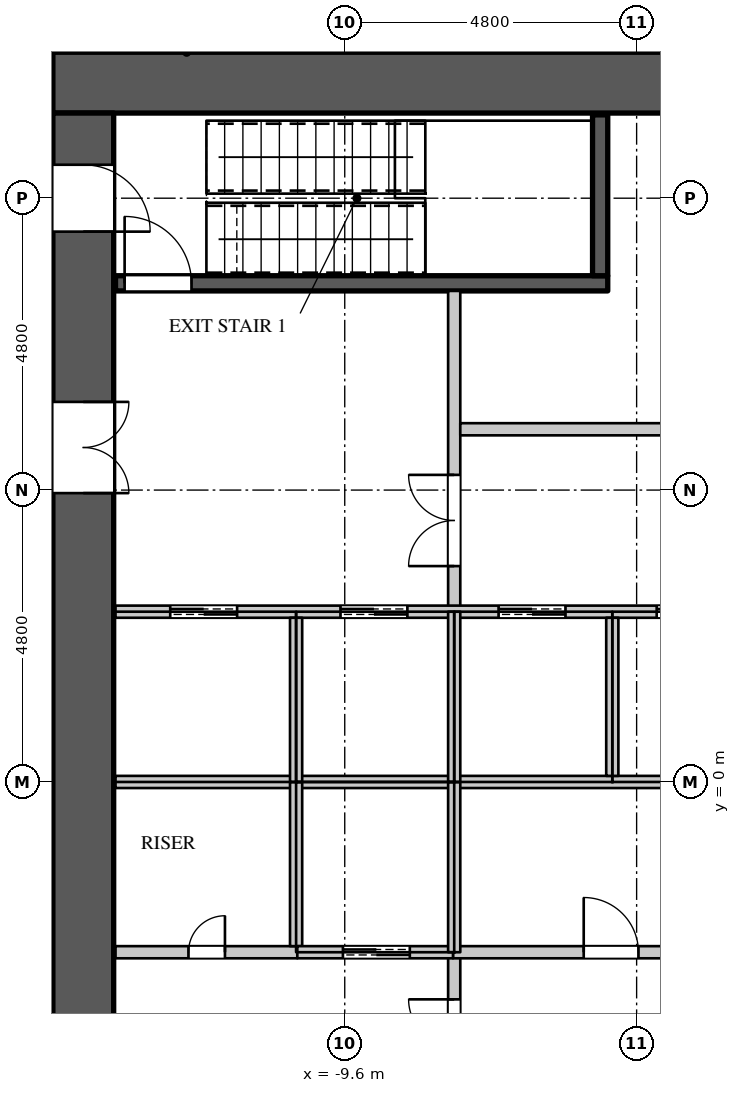
"""IFC4 building model, lengths in metres.
Left out: names, types, materials, properties, quantities, classifications, styles, units other than length and angle.
Written with IfcOpenShell. Run it as: python <this file> out.ifc"""

import sys

from ifc_helpers import new_model, si_unit, direction, frame, frame_2d, origin, place, context, subcontext, project, spatial, rectangle, extrude, element, fill, save


model = new_model("IFC4")
c1 = context("Model", 3, precision=1e-05, world=origin(), true_north=direction((0.0, 1.0)))
c2 = subcontext(c1, "Body", "Model", "MODEL_VIEW")
j1 = project(units=[si_unit("LENGTHUNIT", "METRE"), si_unit("PLANEANGLEUNIT", "RADIAN")], contexts=[c1])
p1 = place(None, origin())
s1 = spatial("IfcSite", under=j1, at=p1, CompositionType="ELEMENT")
p2 = place(p1, origin())
s2 = spatial("IfcBuilding", under=s1, at=p2, CompositionType="ELEMENT")
p3 = place(p2, frame((0.0, 0.0, 96.9)))
s3 = spatial("IfcBuildingStorey", under=s2, at=p3, CompositionType="ELEMENT", Elevation=96.9)
p4 = place(p3, frame((-14.4, 11.5, 0.0), z_axis=(0.0, 0.0, 1.0), x_axis=(1.0, 0.0, 0.0)))
e1 = element("IfcWall", 1, at=p4, inside=s3, PredefinedType="SHEAR", context=c2, shape_type="SweptSolid", body=[
    extrude(rectangle(XDim=28.8, YDim=1.0, at=frame_2d((14.4, 0.0))), origin(), (0.0, 0.0, 1.0), 4.2),
])
p5 = place(p3, frame((-13.9, -11.0, 0.0), z_axis=(0.0, 0.0, 1.0), x_axis=(0.0, 1.0, 0.0)))
e2 = element("IfcWall", 2, at=p5, inside=s3, PredefinedType="SHEAR", context=c2, shape_type="SweptSolid", body=[
    extrude(rectangle(XDim=22.0, YDim=1.0, at=frame_2d((11.0, 0.0))), origin(), (0.0, 0.0, 1.0), 4.2),
])
p6 = place(p5, frame((20.05, 0.0, 0.0)))
e3 = element("IfcOpeningElement", 3, at=p6, cuts=e2, PredefinedType="OPENING", context=c2, shape_type="SweptSolid", body=[
    extrude(rectangle(XDim=1.1, YDim=2.2, at=frame_2d((0.55, 1.1))), frame((0.0, 0.51, 0.0), z_axis=(0.0, -1.0, 0.0), x_axis=(1.0, 0.0, 0.0)), (0.0, 0.0, 1.0), 1.02),
])
p7 = place(p5, frame((0.85, 0.0, 0.0)))
e4 = element("IfcOpeningElement", 4, at=p7, cuts=e2, PredefinedType="OPENING", context=c2, shape_type="SweptSolid", body=[
    extrude(rectangle(XDim=1.1, YDim=2.2, at=frame_2d((0.55, 1.1))), frame((0.0, 0.51, 0.0), z_axis=(0.0, -1.0, 0.0), x_axis=(1.0, 0.0, 0.0)), (0.0, 0.0, 1.0), 1.02),
])
p8 = place(p5, frame((15.75, 0.0, 0.0)))
e5 = element("IfcOpeningElement", 5, at=p8, cuts=e2, PredefinedType="OPENING", context=c2, shape_type="SweptSolid", body=[
    extrude(rectangle(XDim=1.5, YDim=2.4, at=frame_2d((0.75, 1.2))), frame((0.0, 0.51, 0.0), z_axis=(0.0, -1.0, 0.0), x_axis=(1.0, 0.0, 0.0)), (0.0, 0.0, 1.0), 1.02),
])
p9 = place(p5, frame((4.75, 0.0, 0.0)))
e6 = element("IfcOpeningElement", 6, at=p9, cuts=e2, PredefinedType="OPENING", context=c2, shape_type="SweptSolid", body=[
    extrude(rectangle(XDim=1.5, YDim=2.4, at=frame_2d((0.75, 1.2))), frame((0.0, 0.51, 0.0), z_axis=(0.0, -1.0, 0.0), x_axis=(1.0, 0.0, 0.0)), (0.0, 0.0, 1.0), 1.02),
])
p10 = place(p3, frame((-7.8, -8.075, 0.0), z_axis=(0.0, 0.0, 1.0), x_axis=(0.0, 1.0, 0.0)))
e7 = element("IfcWall", 7, at=p10, inside=s3, PredefinedType="PARTITIONING", context=c2, shape_type="SweptSolid", body=[
    extrude(rectangle(XDim=5.275, YDim=0.2, at=frame_2d((2.637, 0.0))), origin(), (0.0, 0.0, 1.0), 3.798),
])
p11 = place(p10, frame((3.0, 0.0, 0.0)))
e8 = element("IfcOpeningElement", 8, at=p11, cuts=e7, PredefinedType="OPENING", context=c2, shape_type="SweptSolid", body=[
    extrude(rectangle(XDim=1.5, YDim=2.4, at=frame_2d((0.75, 1.2))), frame((0.0, 0.11, 0.0), z_axis=(0.0, -1.0, 0.0), x_axis=(1.0, 0.0, 0.0)), (0.0, 0.0, 1.0), 0.22),
])
p12 = place(p3, frame((-7.8, 2.8, 0.0), z_axis=(0.0, 0.0, 1.0), x_axis=(0.0, 1.0, 0.0)))
e9 = element("IfcWall", 9, at=p12, inside=s3, PredefinedType="PARTITIONING", context=c2, shape_type="SweptSolid", body=[
    extrude(rectangle(XDim=5.275, YDim=0.2, at=frame_2d((2.637, 0.0))), origin(), (0.0, 0.0, 1.0), 3.798),
])
p13 = place(p12, frame((0.75, 0.0, 0.0)))
e10 = element("IfcOpeningElement", 10, at=p13, cuts=e9, PredefinedType="OPENING", context=c2, shape_type="SweptSolid", body=[
    extrude(rectangle(XDim=1.5, YDim=2.4, at=frame_2d((0.75, 1.2))), frame((0.0, 0.11, 0.0), z_axis=(0.0, -1.0, 0.0), x_axis=(1.0, 0.0, 0.0)), (0.0, 0.0, 1.0), 0.22),
])
p14 = place(p3, frame((-7.7, 5.8, 0.0), z_axis=(0.0, 0.0, 1.0), x_axis=(1.0, 0.0, 0.0)))
e11 = element("IfcWall", 11, at=p14, inside=s3, PredefinedType="PARTITIONING", context=c2, shape_type="SweptSolid", body=[
    extrude(rectangle(XDim=21.07, YDim=0.2, at=frame_2d((10.535, 0.0))), origin(), (0.0, 0.0, 1.0), 3.798),
])
p15 = place(p14, frame((4.85, 0.0, 0.0)))
e12 = element("IfcOpeningElement", 12, at=p15, cuts=e11, PredefinedType="OPENING", context=c2, shape_type="SweptSolid", body=[
    extrude(rectangle(XDim=0.9, YDim=2.2, at=frame_2d((0.45, 1.1))), frame((0.0, 0.11, 0.0), z_axis=(0.0, -1.0, 0.0), x_axis=(1.0, 0.0, 0.0)), (0.0, 0.0, 1.0), 0.22),
])
p16 = place(p14, frame((15.25, 0.0, 0.0)))
e13 = element("IfcOpeningElement", 13, at=p16, cuts=e11, PredefinedType="OPENING", context=c2, shape_type="SweptSolid", body=[
    extrude(rectangle(XDim=0.9, YDim=2.2, at=frame_2d((0.45, 1.1))), frame((0.0, 0.11, 0.0), z_axis=(0.0, -1.0, 0.0), x_axis=(1.0, 0.0, 0.0)), (0.0, 0.0, 1.0), 0.22),
])
p17 = place(p3, frame((-13.37, -2.8, 0.0), z_axis=(0.0, 0.0, 1.0), x_axis=(1.0, 0.0, 0.0)))
e14 = element("IfcWall", 14, at=p17, inside=s3, PredefinedType="PARTITIONING", context=c2, shape_type="SweptSolid", body=[
    extrude(rectangle(XDim=2.99, YDim=0.2, at=frame_2d((1.495, 0.0))), origin(), (0.0, 0.0, 1.0), 3.798),
])
p18 = place(p17, frame((1.2, 0.0, 0.0)))
e15 = element("IfcOpeningElement", 15, at=p18, cuts=e14, PredefinedType="OPENING", context=c2, shape_type="SweptSolid", body=[
    extrude(rectangle(XDim=0.6, YDim=2.0, at=frame_2d((0.3, 1.0))), frame((0.0, 0.11, 0.0), z_axis=(0.0, -1.0, 0.0), x_axis=(1.0, 0.0, 0.0)), (0.0, 0.0, 1.0), 0.22),
])
p19 = place(p3, frame((-7.82, -2.8, 0.0), z_axis=(0.0, 0.0, 1.0), x_axis=(1.0, 0.0, 0.0)))
e16 = element("IfcWall", 16, at=p19, inside=s3, PredefinedType="PARTITIONING", context=c2, shape_type="SweptSolid", body=[
    extrude(rectangle(XDim=5.2, YDim=0.2, at=frame_2d((2.6, 0.0))), origin(), (0.0, 0.0, 1.0), 3.798),
])
p20 = place(p19, frame((2.15, 0.0, 0.0)))
e17 = element("IfcOpeningElement", 17, at=p20, cuts=e16, PredefinedType="OPENING", context=c2, shape_type="SweptSolid", body=[
    extrude(rectangle(XDim=0.9, YDim=2.2, at=frame_2d((0.45, 1.1))), frame((0.0, 0.11, 0.0), z_axis=(0.0, -1.0, 0.0), x_axis=(1.0, 0.0, 0.0)), (0.0, 0.0, 1.0), 0.22),
])
p21 = place(p3, frame((-13.37, 0.0, 0.0), z_axis=(0.0, 0.0, 1.0), x_axis=(1.0, 0.0, 0.0)))
e18 = element("IfcWall", 18, at=p21, inside=s3, PredefinedType="PARTITIONING", context=c2, shape_type="SweptSolid", body=[
    extrude(rectangle(XDim=23.77, YDim=0.2, at=frame_2d((11.885, 0.0))), origin(), (0.0, 0.0, 1.0), 3.798),
])
p22 = place(p3, frame((-13.37, 2.8, 0.0), z_axis=(0.0, 0.0, 1.0), x_axis=(1.0, 0.0, 0.0)))
e19 = element("IfcWall", 19, at=p22, inside=s3, PredefinedType="PARTITIONING", context=c2, shape_type="SweptSolid", body=[
    extrude(rectangle(XDim=23.77, YDim=0.2, at=frame_2d((11.885, 0.0))), origin(), (0.0, 0.0, 1.0), 3.798),
])
p23 = place(p22, frame((0.9, 0.0, 0.0)))
e20 = element("IfcOpeningElement", 20, at=p23, cuts=e19, PredefinedType="OPENING", context=c2, shape_type="SweptSolid", body=[
    extrude(rectangle(XDim=1.1, YDim=2.2, at=frame_2d((0.55, 1.1))), frame((0.0, 0.11, 0.0), z_axis=(0.0, -1.0, 0.0), x_axis=(1.0, 0.0, 0.0)), (0.0, 0.0, 1.0), 0.22),
])
p24 = place(p22, frame((3.7, 0.0, 0.0)))
e21 = element("IfcOpeningElement", 21, at=p24, cuts=e19, PredefinedType="OPENING", context=c2, shape_type="SweptSolid", body=[
    extrude(rectangle(XDim=1.1, YDim=2.2, at=frame_2d((0.55, 1.1))), frame((0.0, 0.11, 0.0), z_axis=(0.0, -1.0, 0.0), x_axis=(1.0, 0.0, 0.0)), (0.0, 0.0, 1.0), 0.22),
])
p25 = place(p22, frame((6.3, 0.0, 0.0)))
e22 = element("IfcOpeningElement", 22, at=p25, cuts=e19, PredefinedType="OPENING", context=c2, shape_type="SweptSolid", body=[
    extrude(rectangle(XDim=1.1, YDim=2.2, at=frame_2d((0.55, 1.1))), frame((0.0, 0.11, 0.0), z_axis=(0.0, -1.0, 0.0), x_axis=(1.0, 0.0, 0.0)), (0.0, 0.0, 1.0), 0.22),
])
p26 = place(p22, frame((8.9, 0.0, 0.0)))
e23 = element("IfcOpeningElement", 23, at=p26, cuts=e19, PredefinedType="OPENING", context=c2, shape_type="SweptSolid", body=[
    extrude(rectangle(XDim=1.1, YDim=2.2, at=frame_2d((0.55, 1.1))), frame((0.0, 0.11, 0.0), z_axis=(0.0, -1.0, 0.0), x_axis=(1.0, 0.0, 0.0)), (0.0, 0.0, 1.0), 0.22),
])
p27 = place(p22, frame((11.5, 0.0, 0.0)))
e24 = element("IfcOpeningElement", 24, at=p27, cuts=e19, PredefinedType="OPENING", context=c2, shape_type="SweptSolid", body=[
    extrude(rectangle(XDim=1.1, YDim=2.2, at=frame_2d((0.55, 1.1))), frame((0.0, 0.11, 0.0), z_axis=(0.0, -1.0, 0.0), x_axis=(1.0, 0.0, 0.0)), (0.0, 0.0, 1.0), 0.22),
])
p28 = place(p22, frame((14.1, 0.0, 0.0)))
e25 = element("IfcOpeningElement", 25, at=p28, cuts=e19, PredefinedType="OPENING", context=c2, shape_type="SweptSolid", body=[
    extrude(rectangle(XDim=1.1, YDim=2.2, at=frame_2d((0.55, 1.1))), frame((0.0, 0.11, 0.0), z_axis=(0.0, -1.0, 0.0), x_axis=(1.0, 0.0, 0.0)), (0.0, 0.0, 1.0), 0.22),
])
p29 = place(p22, frame((16.7, 0.0, 0.0)))
e26 = element("IfcOpeningElement", 26, at=p29, cuts=e19, PredefinedType="OPENING", context=c2, shape_type="SweptSolid", body=[
    extrude(rectangle(XDim=1.1, YDim=2.2, at=frame_2d((0.55, 1.1))), frame((0.0, 0.11, 0.0), z_axis=(0.0, -1.0, 0.0), x_axis=(1.0, 0.0, 0.0)), (0.0, 0.0, 1.0), 0.22),
])
p30 = place(p22, frame((19.3, 0.0, 0.0)))
e27 = element("IfcOpeningElement", 27, at=p30, cuts=e19, PredefinedType="OPENING", context=c2, shape_type="SweptSolid", body=[
    extrude(rectangle(XDim=1.1, YDim=2.2, at=frame_2d((0.55, 1.1))), frame((0.0, 0.11, 0.0), z_axis=(0.0, -1.0, 0.0), x_axis=(1.0, 0.0, 0.0)), (0.0, 0.0, 1.0), 0.22),
])
p31 = place(p3, frame((-10.4, -2.7, 0.0), z_axis=(0.0, 0.0, 1.0), x_axis=(0.0, 1.0, 0.0)))
e28 = element("IfcWall", 28, at=p31, inside=s3, PredefinedType="PARTITIONING", context=c2, shape_type="SweptSolid", body=[
    extrude(rectangle(XDim=2.7, YDim=0.2, at=frame_2d((1.35, 0.0))), origin(), (0.0, 0.0, 1.0), 3.798),
])
p32 = place(p3, frame((-10.38, -2.8, 0.0), z_axis=(0.0, 0.0, 1.0), x_axis=(1.0, 0.0, 0.0)))
e29 = element("IfcWall", 29, at=p32, inside=s3, PredefinedType="PARTITIONING", context=c2, shape_type="SweptSolid", body=[
    extrude(rectangle(XDim=2.56, YDim=0.2, at=frame_2d((1.28, 0.0))), origin(), (0.0, 0.0, 1.0), 3.798),
])
p33 = place(p32, frame((0.75, 0.0, 0.0)))
e30 = element("IfcOpeningElement", 30, at=p33, cuts=e29, PredefinedType="OPENING", context=c2, shape_type="SweptSolid", body=[
    extrude(rectangle(XDim=1.1, YDim=2.2, at=frame_2d((0.55, 1.1))), frame((0.0, 0.11, 0.0), z_axis=(0.0, -1.0, 0.0), x_axis=(1.0, 0.0, 0.0)), (0.0, 0.0, 1.0), 0.22),
])
p34 = place(p3, frame((-10.4, 0.0, 0.0), z_axis=(0.0, 0.0, 1.0), x_axis=(0.0, 1.0, 0.0)))
e31 = element("IfcWall", 31, at=p34, inside=s3, PredefinedType="PARTITIONING", context=c2, shape_type="SweptSolid", body=[
    extrude(rectangle(XDim=2.7, YDim=0.2, at=frame_2d((1.35, 0.0))), origin(), (0.0, 0.0, 1.0), 3.798),
])
for number, where, z_axis, x_axis in (
    (32, (-7.8, -2.8, 0.0), (0.0, 0.0, 1.0), (0.0, 1.0, 0.0)),
    (33, (-7.8, 0.0, 0.0), (0.0, 0.0, 1.0), (0.0, 1.0, 0.0)),
):
    element("IfcWall", number, at=place(p3, frame(where, z_axis=z_axis, x_axis=x_axis)), inside=s3, PredefinedType="PARTITIONING", context=c2, shape_type="SweptSolid", body=[
        extrude(rectangle(XDim=2.8, YDim=0.2, at=frame_2d((1.4, 0.0))), origin(), (0.0, 0.0, 1.0), 3.798),
    ])
p35 = place(p3, frame((-5.2, 0.1, 0.0), z_axis=(0.0, 0.0, 1.0), x_axis=(0.0, 1.0, 0.0)))
e34 = element("IfcWall", 34, at=p35, inside=s3, PredefinedType="PARTITIONING", context=c2, shape_type="SweptSolid", body=[
    extrude(rectangle(XDim=2.6, YDim=0.2, at=frame_2d((1.3, 0.0))), origin(), (0.0, 0.0, 1.0), 3.798),
])
p36 = place(p3, frame((-13.37, 8.2, 0.0), z_axis=(0.0, 0.0, 1.0), x_axis=(1.0, 0.0, 0.0)))
e35 = element("IfcWall", 35, at=p36, inside=s3, PredefinedType="SHEAR", context=c2, shape_type="SweptSolid", body=[
    extrude(rectangle(XDim=8.095, YDim=0.25, at=frame_2d((4.048, 0.0))), origin(), (0.0, 0.0, 1.0), 3.798),
])
p37 = place(p36, frame((0.15, 0.0, 0.0)))
e36 = element("IfcOpeningElement", 36, at=p37, cuts=e35, PredefinedType="OPENING", context=c2, shape_type="SweptSolid", body=[
    extrude(rectangle(XDim=1.1, YDim=2.2, at=frame_2d((0.55, 1.1))), frame((0.0, 0.135, 0.0), z_axis=(0.0, -1.0, 0.0), x_axis=(1.0, 0.0, 0.0)), (0.0, 0.0, 1.0), 0.27),
])
p38 = place(p3, frame((-5.4, 8.325, 0.0), z_axis=(0.0, 0.0, 1.0), x_axis=(0.0, 1.0, 0.0)))
e37 = element("IfcWall", 37, at=p38, inside=s3, PredefinedType="SHEAR", context=c2, shape_type="SweptSolid", body=[
    extrude(rectangle(XDim=2.645, YDim=0.25, at=frame_2d((1.323, 0.0))), origin(), (0.0, 0.0, 1.0), 3.798),
])
p39 = place(p18, origin())
e38 = element("IfcDoor", 38, at=p39, inside=s3, OperationType="SINGLE_SWING_RIGHT", PredefinedType="DOOR", context=c2, shape_type="SweptSolid", body=[
    extrude(rectangle(XDim=0.6, YDim=2.0, at=frame_2d((0.3, 1.0))), frame((0.0, 0.025, 0.0), z_axis=(0.0, -1.0, 0.0), x_axis=(1.0, 0.0, 0.0)), (0.0, 0.0, 1.0), 0.05),
])
fill(e15, e38)
p40 = place(p20, origin())
e39 = element("IfcDoor", 39, at=p40, inside=s3, OperationType="SINGLE_SWING_LEFT", PredefinedType="DOOR", context=c2, shape_type="SweptSolid", body=[
    extrude(rectangle(XDim=0.9, YDim=2.2, at=frame_2d((0.45, 1.1))), frame((0.0, 0.025, 0.0), z_axis=(0.0, -1.0, 0.0), x_axis=(1.0, 0.0, 0.0)), (0.0, 0.0, 1.0), 0.05),
])
fill(e17, e39)
p41 = place(p23, origin())
e40 = element("IfcDoor", 40, at=p41, inside=s3, OperationType="DOUBLE_DOOR_SLIDING", PredefinedType="DOOR", context=c2, shape_type="SweptSolid", body=[
    extrude(rectangle(XDim=1.1, YDim=2.2, at=frame_2d((0.55, 1.1))), frame((0.0, 0.025, 0.0), z_axis=(0.0, -1.0, 0.0), x_axis=(1.0, 0.0, 0.0)), (0.0, 0.0, 1.0), 0.05),
])
fill(e20, e40)
p42 = place(p24, origin())
e41 = element("IfcDoor", 41, at=p42, inside=s3, OperationType="DOUBLE_DOOR_SLIDING", PredefinedType="DOOR", context=c2, shape_type="SweptSolid", body=[
    extrude(rectangle(XDim=1.1, YDim=2.2, at=frame_2d((0.55, 1.1))), frame((0.0, 0.025, 0.0), z_axis=(0.0, -1.0, 0.0), x_axis=(1.0, 0.0, 0.0)), (0.0, 0.0, 1.0), 0.05),
])
fill(e21, e41)
p43 = place(p33, origin())
e42 = element("IfcDoor", 42, at=p43, inside=s3, OperationType="DOUBLE_DOOR_SLIDING", PredefinedType="DOOR", context=c2, shape_type="SweptSolid", body=[
    extrude(rectangle(XDim=1.1, YDim=2.2, at=frame_2d((0.55, 1.1))), frame((0.0, 0.025, 0.0), z_axis=(0.0, -1.0, 0.0), x_axis=(1.0, 0.0, 0.0)), (0.0, 0.0, 1.0), 0.05),
])
fill(e30, e42)
p44 = place(p25, origin())
e43 = element("IfcDoor", 43, at=p44, inside=s3, OperationType="DOUBLE_DOOR_SLIDING", PredefinedType="DOOR", context=c2, shape_type="SweptSolid", body=[
    extrude(rectangle(XDim=1.1, YDim=2.2, at=frame_2d((0.55, 1.1))), frame((0.0, 0.025, 0.0), z_axis=(0.0, -1.0, 0.0), x_axis=(1.0, 0.0, 0.0)), (0.0, 0.0, 1.0), 0.05),
])
fill(e22, e43)
p45 = place(p26, origin())
e44 = element("IfcDoor", 44, at=p45, inside=s3, OperationType="DOUBLE_DOOR_SLIDING", PredefinedType="DOOR", context=c2, shape_type="SweptSolid", body=[
    extrude(rectangle(XDim=1.1, YDim=2.2, at=frame_2d((0.55, 1.1))), frame((0.0, 0.025, 0.0), z_axis=(0.0, -1.0, 0.0), x_axis=(1.0, 0.0, 0.0)), (0.0, 0.0, 1.0), 0.05),
])
fill(e23, e44)
p46 = place(p37, origin())
e45 = element("IfcDoor", 45, at=p46, inside=s3, OperationType="SINGLE_SWING_LEFT", PredefinedType="DOOR", context=c2, shape_type="SweptSolid", body=[
    extrude(rectangle(XDim=1.1, YDim=2.2, at=frame_2d((0.55, 1.1))), frame((0.0, 0.025, 0.0), z_axis=(0.0, -1.0, 0.0), x_axis=(1.0, 0.0, 0.0)), (0.0, 0.0, 1.0), 0.05),
])
fill(e36, e45)
p47 = place(p13, origin())
e46 = element("IfcDoor", 46, at=p47, inside=s3, OperationType="DOUBLE_DOOR_SINGLE_SWING", PredefinedType="DOOR", context=c2, shape_type="SweptSolid", body=[
    extrude(rectangle(XDim=1.5, YDim=2.4, at=frame_2d((0.75, 1.2))), frame((0.0, 0.025, 0.0), z_axis=(0.0, -1.0, 0.0), x_axis=(1.0, 0.0, 0.0)), (0.0, 0.0, 1.0), 0.05),
])
fill(e10, e46)
p48 = place(p11, origin())
e47 = element("IfcDoor", 47, at=p48, inside=s3, OperationType="DOUBLE_DOOR_SINGLE_SWING", PredefinedType="DOOR", context=c2, shape_type="SweptSolid", body=[
    extrude(rectangle(XDim=1.5, YDim=2.4, at=frame_2d((0.75, 1.2))), frame((0.0, 0.025, 0.0), z_axis=(0.0, -1.0, 0.0), x_axis=(1.0, 0.0, 0.0)), (0.0, 0.0, 1.0), 0.05),
])
fill(e8, e47)
p49 = place(p6, origin())
e48 = element("IfcDoor", 48, at=p49, inside=s3, OperationType="SINGLE_SWING_RIGHT", PredefinedType="DOOR", context=c2, shape_type="SweptSolid", body=[
    extrude(rectangle(XDim=1.1, YDim=2.2, at=frame_2d((0.55, 1.1))), frame((0.0, -0.445, 0.0), z_axis=(0.0, -1.0, 0.0), x_axis=(1.0, 0.0, 0.0)), (0.0, 0.0, 1.0), 0.05),
])
fill(e3, e48)
p50 = place(p8, origin())
e49 = element("IfcDoor", 49, at=p50, inside=s3, OperationType="DOUBLE_DOOR_SINGLE_SWING", PredefinedType="DOOR", context=c2, shape_type="SweptSolid", body=[
    extrude(rectangle(XDim=1.5, YDim=2.4, at=frame_2d((0.75, 1.2))), frame((0.0, -0.445, 0.0), z_axis=(0.0, -1.0, 0.0), x_axis=(1.0, 0.0, 0.0)), (0.0, 0.0, 1.0), 0.05),
])
fill(e5, e49)
save(model, sys.argv[1])
